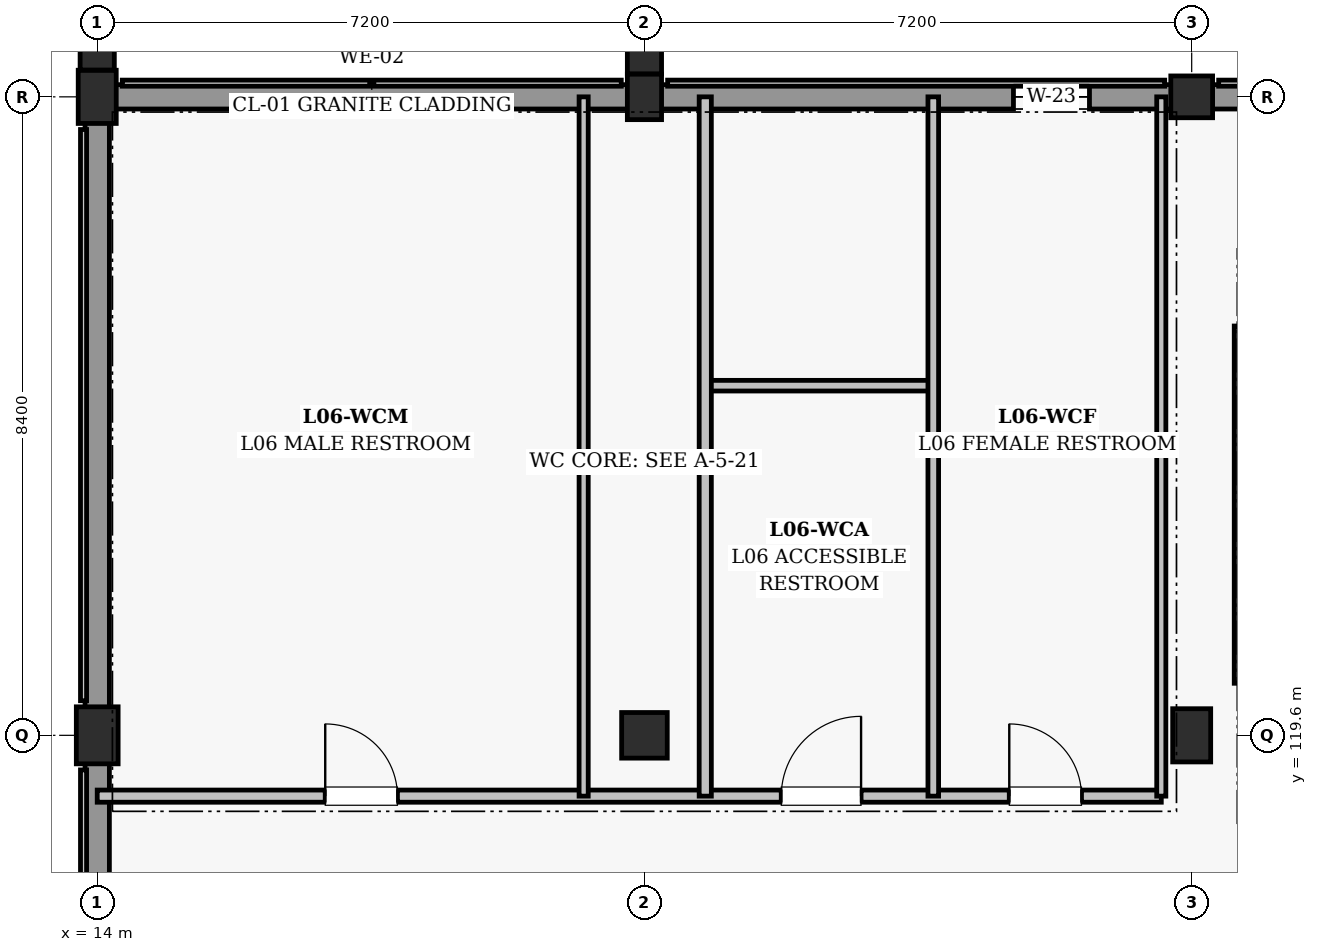
"""IFC4 building model, lengths in metres.
Left out: names, types, materials, properties, quantities, classifications, styles, units other than length and angle.
Written with IfcOpenShell. Run it as: python <this file> out.ifc"""

import sys

from ifc_helpers import new_model, si_unit, direction, frame, frame_2d, origin, origin_2d, place, context, subcontext, project, spatial, rectangle, extrude, element, fill, save


model = new_model("IFC4")
c1 = context("Model", 3, precision=1e-05, world=origin(), true_north=direction((0.0, 1.0)))
c2 = subcontext(c1, "Body", "Model", "MODEL_VIEW")
j1 = project(units=[si_unit("LENGTHUNIT", "METRE"), si_unit("PLANEANGLEUNIT", "RADIAN")], contexts=[c1])
p1 = place(None, origin())
s1 = spatial("IfcSite", under=j1, at=p1, CompositionType="ELEMENT")
p2 = place(p1, origin())
s2 = spatial("IfcBuilding", under=s1, at=p2, CompositionType="ELEMENT")
p3 = place(p2, frame((0.0, 0.0, 27.9)))
s3 = spatial("IfcBuildingStorey", under=s2, at=p3, CompositionType="ELEMENT", Elevation=27.9)
p4 = place(p3, frame((14.0, 119.6, 0.0), z_axis=(0.0, 0.0, 1.0), x_axis=(1.0, 0.0, 0.0)))
e1 = element("IfcColumn", 1, at=p4, inside=s3, PredefinedType="COLUMN", context=c2, shape_type="SweptSolid", body=[
    extrude(rectangle(XDim=0.55, YDim=0.75, at=origin_2d()), origin(), (0.0, 0.0, 1.0), 4.5),
])
p5 = place(p3, frame((14.0, 128.0, 0.0), z_axis=(0.0, 0.0, 1.0), x_axis=(1.0, 0.0, 0.0)))
e2 = element("IfcColumn", 2, at=p5, inside=s3, PredefinedType="COLUMN", context=c2, shape_type="SweptSolid", body=[
    extrude(rectangle(XDim=0.5, YDim=0.7, at=origin_2d()), origin(), (0.0, 0.0, 1.0), 4.5),
])
p6 = place(p3, frame((21.2, 119.6, 0.0), z_axis=(0.0, 0.0, 1.0), x_axis=(1.0, 0.0, 0.0)))
e3 = element("IfcColumn", 3, at=p6, inside=s3, PredefinedType="COLUMN", context=c2, shape_type="SweptSolid", body=[
    extrude(rectangle(XDim=0.6, YDim=0.6, at=origin_2d()), origin(), (0.0, 0.0, 1.0), 4.5),
])
p7 = place(p3, frame((21.2, 128.0, 0.0), z_axis=(0.0, 0.0, 1.0), x_axis=(1.0, 0.0, 0.0)))
e4 = element("IfcColumn", 4, at=p7, inside=s3, PredefinedType="COLUMN", context=c2, shape_type="SweptSolid", body=[
    extrude(rectangle(XDim=0.45, YDim=0.6, at=origin_2d()), origin(), (0.0, 0.0, 1.0), 4.5),
])
p8 = place(p3, frame((28.4, 119.6, 0.0), z_axis=(0.0, 0.0, 1.0), x_axis=(1.0, 0.0, 0.0)))
e5 = element("IfcColumn", 5, at=p8, inside=s3, PredefinedType="COLUMN", context=c2, shape_type="SweptSolid", body=[
    extrude(rectangle(XDim=0.5, YDim=0.7, at=origin_2d()), origin(), (0.0, 0.0, 1.0), 4.5),
])
p9 = place(p3, frame((28.4, 128.0, 0.0), z_axis=(0.0, 0.0, 1.0), x_axis=(1.0, 0.0, 0.0)))
e6 = element("IfcColumn", 6, at=p9, inside=s3, PredefinedType="COLUMN", context=c2, shape_type="SweptSolid", body=[
    extrude(rectangle(XDim=0.55, YDim=0.55, at=origin_2d()), origin(), (0.0, 0.0, 1.0), 4.5),
])
for number, where, z_axis, x_axis in (
    (7, (14.0, 128.678, 0.0), (0.0, 0.0, 1.0), (1.0, 0.0, 0.0)),
    (8, (21.2, 128.628, 0.0), (0.0, 0.0, 1.0), (1.0, 0.0, 0.0)),
):
    element("IfcColumn", number, at=place(p3, frame(where, z_axis=z_axis, x_axis=x_axis)), inside=s3, PredefinedType="PILASTER", context=c2, shape_type="SweptSolid", body=[
        extrude(rectangle(XDim=0.45, YDim=0.65, at=origin_2d()), origin(), (0.0, 0.0, 1.0), 4.5),
    ])
p10 = place(p3, frame((14.23, 128.0, 0.0), z_axis=(0.0, 0.0, 1.0), x_axis=(1.0, 0.0, 0.0)))
e9 = element("IfcWall", 9, at=p10, inside=s3, PredefinedType="SOLIDWALL", context=c2, shape_type="SweptSolid", body=[
    extrude(rectangle(XDim=6.765, YDim=0.32, at=frame_2d((3.383, 0.0))), origin(), (0.0, 0.0, 1.0), 3.305),
])
p11 = place(p3, frame((21.405, 128.0, 0.0), z_axis=(0.0, 0.0, 1.0), x_axis=(1.0, 0.0, 0.0)))
e10 = element("IfcWall", 10, at=p11, inside=s3, PredefinedType="SOLIDWALL", context=c2, shape_type="SweptSolid", body=[
    extrude(rectangle(XDim=6.74, YDim=0.32, at=frame_2d((3.37, 0.0))), origin(), (0.0, 0.0, 1.0), 3.305),
])
p12 = place(p11, frame((4.65, 0.0, 1.85)))
e11 = element("IfcOpeningElement", 11, at=p12, cuts=e10, PredefinedType="OPENING", context=c2, shape_type="SweptSolid", body=[
    extrude(rectangle(XDim=1.0, YDim=0.95, at=frame_2d((0.5, 0.475))), frame((0.0, 0.17, 0.0), z_axis=(0.0, -1.0, 0.0), x_axis=(1.0, 0.0, 0.0)), (0.0, 0.0, 1.0), 0.34),
])
p13 = place(p3, frame((28.655, 128.0, 0.0), z_axis=(0.0, 0.0, 1.0), x_axis=(1.0, 0.0, 0.0)))
e12 = element("IfcWall", 12, at=p13, inside=s3, PredefinedType="SOLIDWALL", context=c2, shape_type="SweptSolid", body=[
    extrude(rectangle(XDim=6.69, YDim=0.32, at=frame_2d((3.345, 0.0))), origin(), (0.0, 0.0, 1.0), 3.355),
])
p14 = place(p3, frame((14.0, 111.48, 0.0), z_axis=(0.0, 0.0, 1.0), x_axis=(0.0, 1.0, 0.0)))
e13 = element("IfcWall", 13, at=p14, inside=s3, PredefinedType="SOLIDWALL", context=c2, shape_type="SweptSolid", body=[
    extrude(rectangle(XDim=7.765, YDim=0.32, at=frame_2d((3.883, 0.0))), origin(), (0.0, 0.0, 1.0), 3.405),
])
p15 = place(p3, frame((14.0, 119.955, 0.0), z_axis=(0.0, 0.0, 1.0), x_axis=(0.0, 1.0, 0.0)))
e14 = element("IfcWall", 14, at=p15, inside=s3, PredefinedType="SOLIDWALL", context=c2, shape_type="SweptSolid", body=[
    extrude(rectangle(XDim=7.715, YDim=0.32, at=frame_2d((3.857, 0.0))), origin(), (0.0, 0.0, 1.0), 3.405),
])
p16 = place(p3, frame((29.085, 124.985, 0.0), z_axis=(0.0, 0.0, 1.0), x_axis=(0.0, -1.0, 0.0)))
e15 = element("IfcWall", 15, at=p16, inside=s3, PredefinedType="SHEAR", context=c2, shape_type="SweptSolid", body=[
    extrude(rectangle(XDim=4.7, YDim=0.25, at=frame_2d((2.35, 0.0))), origin(), (0.0, 0.0, 1.0), 4.175),
])
p17 = place(p3, frame((14.0, 118.8, 0.0), z_axis=(0.0, 0.0, 1.0), x_axis=(1.0, 0.0, 0.0)))
e16 = element("IfcWall", 16, at=p17, inside=s3, PredefinedType="PARTITIONING", context=c2, shape_type="SweptSolid", body=[
    extrude(rectangle(XDim=14.0, YDim=0.16, at=frame_2d((7.0, 0.0))), origin(), (0.0, 0.0, 1.0), 3.36),
])
p18 = place(p17, frame((3.0, 0.0, 0.0)))
e17 = element("IfcOpeningElement", 17, at=p18, cuts=e16, PredefinedType="OPENING", context=c2, shape_type="SweptSolid", body=[
    extrude(rectangle(XDim=0.95, YDim=2.15, at=frame_2d((0.475, 1.075))), frame((0.0, 0.09, 0.0), z_axis=(0.0, -1.0, 0.0), x_axis=(1.0, 0.0, 0.0)), (0.0, 0.0, 1.0), 0.18),
])
p19 = place(p17, frame((9.0, 0.0, 0.0)))
e18 = element("IfcOpeningElement", 18, at=p19, cuts=e16, PredefinedType="OPENING", context=c2, shape_type="SweptSolid", body=[
    extrude(rectangle(XDim=1.05, YDim=2.15, at=frame_2d((0.525, 1.075))), frame((0.0, 0.09, 0.0), z_axis=(0.0, -1.0, 0.0), x_axis=(1.0, 0.0, 0.0)), (0.0, 0.0, 1.0), 0.18),
])
p20 = place(p17, frame((12.0, 0.0, 0.0)))
e19 = element("IfcOpeningElement", 19, at=p20, cuts=e16, PredefinedType="OPENING", context=c2, shape_type="SweptSolid", body=[
    extrude(rectangle(XDim=0.95, YDim=2.15, at=frame_2d((0.475, 1.075))), frame((0.0, 0.09, 0.0), z_axis=(0.0, -1.0, 0.0), x_axis=(1.0, 0.0, 0.0)), (0.0, 0.0, 1.0), 0.18),
])
p21 = place(p3, frame((22.0, 124.2, 0.0), z_axis=(0.0, 0.0, 1.0), x_axis=(1.0, 0.0, 0.0)))
e20 = element("IfcWall", 20, at=p21, inside=s3, PredefinedType="PARTITIONING", context=c2, shape_type="SweptSolid", body=[
    extrude(rectangle(XDim=3.0, YDim=0.14, at=frame_2d((1.5, 0.0))), origin(), (0.0, 0.0, 1.0), 3.56),
])
p22 = place(p3, frame((20.4, 118.8, 0.0), z_axis=(0.0, 0.0, 1.0), x_axis=(0.0, 1.0, 0.0)))
e21 = element("IfcWall", 21, at=p22, inside=s3, PredefinedType="PARTITIONING", context=c2, shape_type="SweptSolid", body=[
    extrude(rectangle(XDim=9.2, YDim=0.12, at=frame_2d((4.6, 0.0))), origin(), (0.0, 0.0, 1.0), 3.41),
])
p23 = place(p3, frame((22.0, 118.8, 0.0), z_axis=(0.0, 0.0, 1.0), x_axis=(0.0, 1.0, 0.0)))
e22 = element("IfcWall", 22, at=p23, inside=s3, PredefinedType="PARTITIONING", context=c2, shape_type="SweptSolid", body=[
    extrude(rectangle(XDim=9.2, YDim=0.16, at=frame_2d((4.6, 0.0))), origin(), (0.0, 0.0, 1.0), 3.36),
])
p24 = place(p3, frame((25.0, 118.8, 0.0), z_axis=(0.0, 0.0, 1.0), x_axis=(0.0, 1.0, 0.0)))
e23 = element("IfcWall", 23, at=p24, inside=s3, PredefinedType="PARTITIONING", context=c2, shape_type="SweptSolid", body=[
    extrude(rectangle(XDim=9.2, YDim=0.14, at=frame_2d((4.6, 0.0))), origin(), (0.0, 0.0, 1.0), 3.36),
])
p25 = place(p3, frame((28.0, 118.8, 0.0), z_axis=(0.0, 0.0, 1.0), x_axis=(0.0, 1.0, 0.0)))
e24 = element("IfcWall", 24, at=p25, inside=s3, PredefinedType="PARTITIONING", context=c2, shape_type="SweptSolid", body=[
    extrude(rectangle(XDim=9.2, YDim=0.12, at=frame_2d((4.6, 0.0))), origin(), (0.0, 0.0, 1.0), 3.36),
])
p26 = place(p12, origin())
e25 = element("IfcWindow", 25, at=p26, inside=s3, PartitioningType="SINGLE_PANEL", PredefinedType="WINDOW", context=c2, shape_type="SweptSolid", body=[
    extrude(rectangle(XDim=1.0, YDim=0.95, at=frame_2d((0.5, 0.475))), frame((0.0, 0.03, 0.0), z_axis=(0.0, -1.0, 0.0), x_axis=(1.0, 0.0, 0.0)), (0.0, 0.0, 1.0), 0.06),
])
fill(e11, e25)
p27 = place(p18, origin())
e26 = element("IfcDoor", 26, at=p27, inside=s3, OperationType="SINGLE_SWING_LEFT", PredefinedType="DOOR", context=c2, shape_type="SweptSolid", body=[
    extrude(rectangle(XDim=0.95, YDim=2.15, at=frame_2d((0.475, 1.075))), frame((0.0, 0.025, 0.0), z_axis=(0.0, -1.0, 0.0), x_axis=(1.0, 0.0, 0.0)), (0.0, 0.0, 1.0), 0.05),
])
fill(e17, e26)
p28 = place(p19, origin())
e27 = element("IfcDoor", 27, at=p28, inside=s3, OperationType="SINGLE_SWING_RIGHT", PredefinedType="DOOR", context=c2, shape_type="SweptSolid", body=[
    extrude(rectangle(XDim=1.05, YDim=2.15, at=frame_2d((0.525, 1.075))), frame((0.0, 0.025, 0.0), z_axis=(0.0, -1.0, 0.0), x_axis=(1.0, 0.0, 0.0)), (0.0, 0.0, 1.0), 0.05),
])
fill(e18, e27)
p29 = place(p20, origin())
e28 = element("IfcDoor", 28, at=p29, inside=s3, OperationType="SINGLE_SWING_LEFT", PredefinedType="DOOR", context=c2, shape_type="SweptSolid", body=[
    extrude(rectangle(XDim=0.95, YDim=2.15, at=frame_2d((0.475, 1.075))), frame((0.0, 0.025, 0.0), z_axis=(0.0, -1.0, 0.0), x_axis=(1.0, 0.0, 0.0)), (0.0, 0.0, 1.0), 0.05),
])
fill(e19, e28)
save(model, sys.argv[1])
